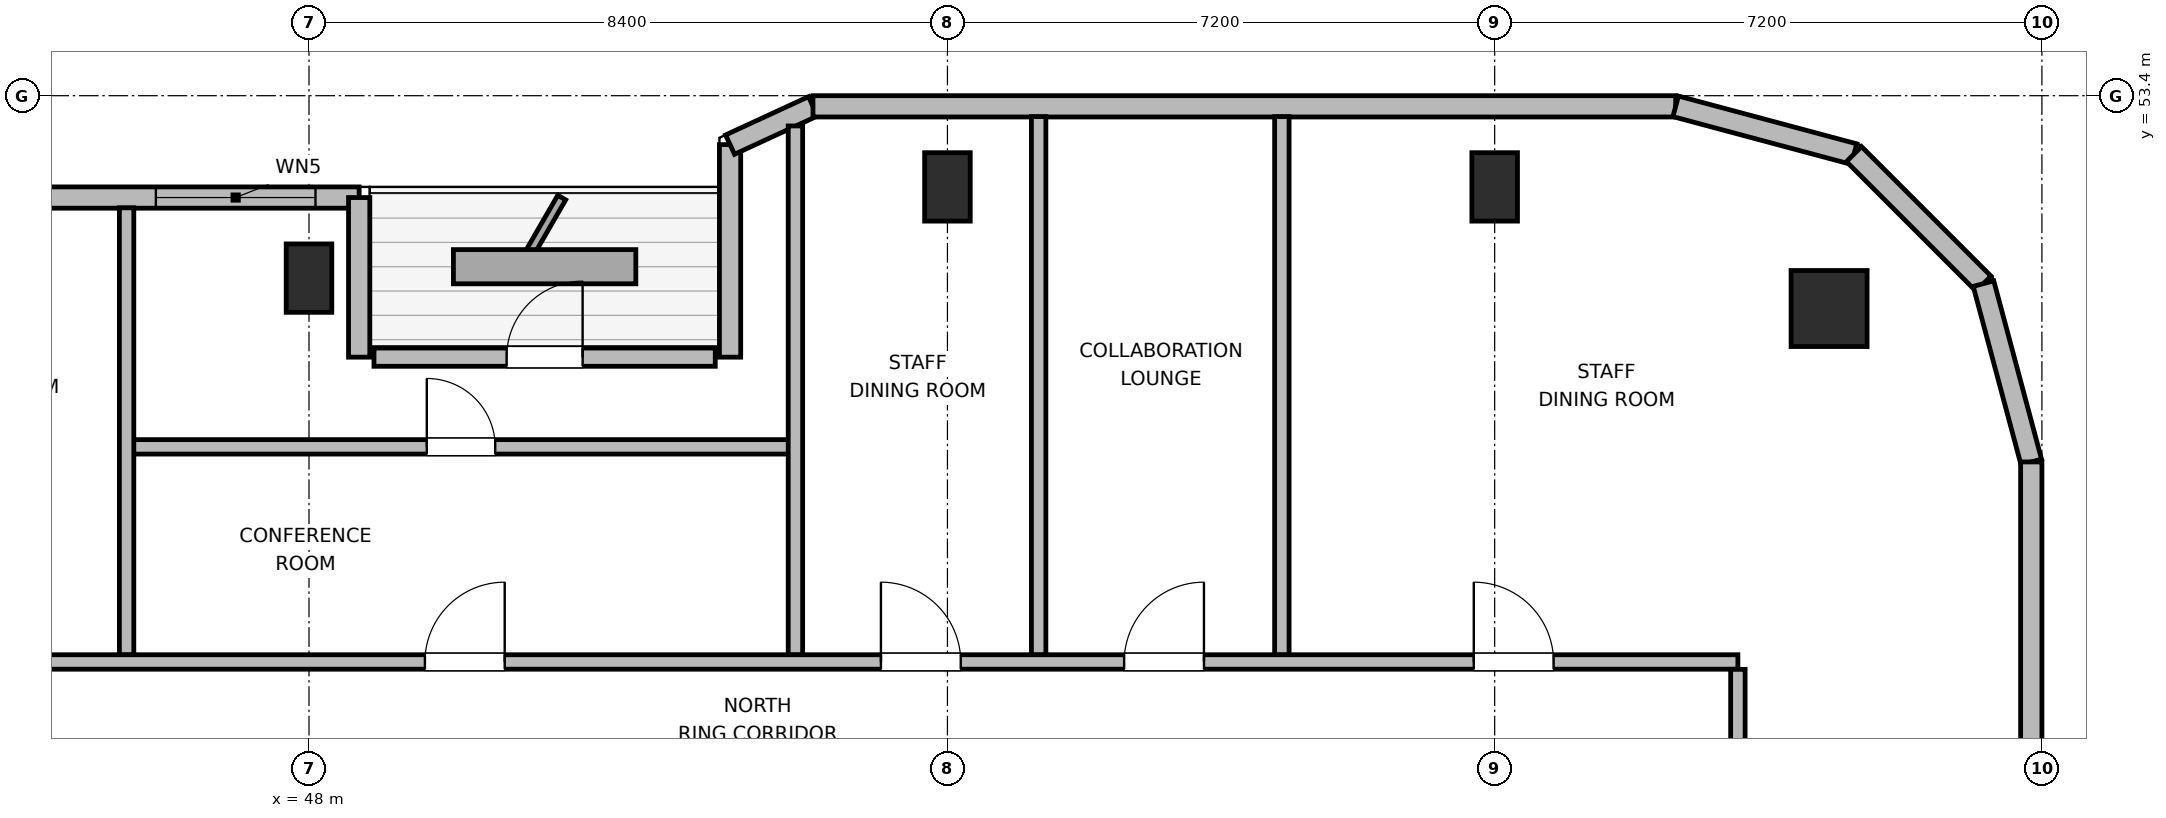
"""IFC4 building model, lengths in metres.
Left out: names, types, materials, properties, quantities, classifications, styles, units other than length and angle.
Written with IfcOpenShell. Run it as: python <this file> out.ifc"""

import sys

from ifc_helpers import new_model, si_unit, direction, frame, frame_2d, origin, origin_2d, place, context, subcontext, project, spatial, rectangle, circle, extrude, element, fill, save


model = new_model("IFC4")
c1 = context("Model", 3, precision=1e-05, world=origin(), true_north=direction((0.0, 1.0)))
c2 = subcontext(c1, "Body", "Model", "MODEL_VIEW")
j1 = project(units=[si_unit("LENGTHUNIT", "METRE"), si_unit("PLANEANGLEUNIT", "RADIAN")], contexts=[c1])
p1 = place(None, origin())
s1 = spatial("IfcSite", under=j1, at=p1, CompositionType="ELEMENT")
p2 = place(p1, origin())
s2 = spatial("IfcBuilding", under=s1, at=p2, CompositionType="ELEMENT")
p3 = place(p2, frame((0.0, 0.0, 346.5)))
s3 = spatial("IfcBuildingStorey", under=s2, at=p3, CompositionType="ELEMENT", Elevation=346.5)
p4 = place(p3, frame((68.0, 50.6, 0.0), z_axis=(0.0, 0.0, 1.0), x_axis=(1.0, 0.0, 0.0)))
e1 = element("IfcColumn", 1, at=p4, inside=s3, PredefinedType="COLUMN", context=c2, shape_type="SweptSolid", body=[
    extrude(circle(Radius=0.5, at=origin_2d()), origin(), (0.0, 0.0, 1.0), 3.9),
])
for number, where, z_axis, x_axis in (
    (2, (48.0, 51.0, 0.0), (0.0, 0.0, 1.0), (1.0, 0.0, 0.0)),
    (3, (56.4, 52.2, 0.0), (0.0, 0.0, 1.0), (1.0, 0.0, 0.0)),
    (4, (63.6, 52.2, 0.0), (0.0, 0.0, 1.0), (1.0, 0.0, 0.0)),
):
    element("IfcColumn", number, at=place(p3, frame(where, z_axis=z_axis, x_axis=x_axis)), inside=s3, PredefinedType="COLUMN", context=c2, shape_type="SweptSolid", body=[
        extrude(rectangle(XDim=0.6, YDim=0.9, at=origin_2d()), origin(), (0.0, 0.0, 1.0), 3.9),
    ])
p5 = place(p3, frame((43.969, 52.06, 0.0), z_axis=(0.0, 0.0, 1.0), x_axis=(1.0, 0.0, 0.0)))
e5 = element("IfcWall", 5, at=p5, inside=s3, PredefinedType="SOLIDWALL", context=c2, shape_type="SweptSolid", body=[
    extrude(rectangle(XDim=4.691, YDim=0.28, at=frame_2d((2.345, 0.0))), origin(), (0.0, 0.0, 1.0), 2.215),
])
p6 = place(p5, frame((2.016, 0.0, 0.85)))
e6 = element("IfcOpeningElement", 6, at=p6, cuts=e5, PredefinedType="OPENING", context=c2, shape_type="SweptSolid", body=[
    extrude(rectangle(XDim=2.1, YDim=1.05, at=frame_2d((1.05, 0.525))), frame((0.0, 0.15, 0.0), z_axis=(0.0, -1.0, 0.0), x_axis=(1.0, 0.0, 0.0)), (0.0, 0.0, 1.0), 0.3),
])
p7 = place(p3, frame((48.66, 52.06, 0.0), z_axis=(0.0, 0.0, 1.0), x_axis=(0.0, -1.0, 0.0)))
e7 = element("IfcWall", 7, at=p7, inside=s3, PredefinedType="SOLIDWALL", context=c2, shape_type="SweptSolid", body=[
    extrude(rectangle(XDim=2.1, YDim=0.28, at=frame_2d((1.05, 0.0))), origin(), (0.0, 0.0, 1.0), 2.215),
])
p8 = place(p3, frame((48.855, 49.96, 0.0), z_axis=(0.0, 0.0, 1.0), x_axis=(1.0, 0.0, 0.0)))
e8 = element("IfcWall", 8, at=p8, inside=s3, PredefinedType="SOLIDWALL", context=c2, shape_type="SweptSolid", body=[
    extrude(rectangle(XDim=4.49, YDim=0.24, at=frame_2d((2.245, 0.0))), origin(), (0.0, 0.0, 1.0), 3.68),
])
p9 = place(p8, frame((1.745, 0.0, 0.0)))
e9 = element("IfcOpeningElement", 9, at=p9, cuts=e8, PredefinedType="OPENING", context=c2, shape_type="SweptSolid", body=[
    extrude(rectangle(XDim=1.0, YDim=2.02, at=frame_2d((0.5, 1.01))), frame((0.0, 0.13, 0.0), z_axis=(0.0, -1.0, 0.0), x_axis=(1.0, 0.0, 0.0)), (0.0, 0.0, 1.0), 0.26),
])
p10 = place(p3, frame((53.54, 49.96, 0.0), z_axis=(0.0, 0.0, 1.0), x_axis=(0.0, 1.0, 0.0)))
e10 = element("IfcWall", 10, at=p10, inside=s3, PredefinedType="SOLIDWALL", context=c2, shape_type="SweptSolid", body=[
    extrude(rectangle(XDim=2.796, YDim=0.28, at=frame_2d((1.398, 0.0))), origin(), (0.0, 0.0, 1.0), 2.215),
])
p11 = place(p3, frame((53.54, 52.756, 0.0), z_axis=(0.0, 0.0, 1.0), x_axis=(0.907893953211, 0.419199916176, 0.0)))
e11 = element("IfcWall", 11, at=p11, inside=s3, PredefinedType="SOLIDWALL", context=c2, shape_type="SweptSolid", body=[
    extrude(rectangle(XDim=1.201, YDim=0.28, at=frame_2d((0.601, 0.0))), origin(), (0.0, 0.0, 1.0), 3.68),
])
p12 = place(p3, frame((54.631, 53.26, 0.0), z_axis=(0.0, 0.0, 1.0), x_axis=(1.0, 0.0, 0.0)))
e12 = element("IfcWall", 12, at=p12, inside=s3, PredefinedType="SOLIDWALL", context=c2, shape_type="SweptSolid", body=[
    extrude(rectangle(XDim=11.351, YDim=0.28, at=frame_2d((5.675, 0.0))), origin(), (0.0, 0.0, 1.0), 3.68),
])
p13 = place(p3, frame((65.982, 53.26, 0.0), z_axis=(0.0, 0.0, 1.0), x_axis=(0.965937282298, -0.25877628691, 0.0)))
e13 = element("IfcWall", 13, at=p13, inside=s3, PredefinedType="SOLIDWALL", context=c2, shape_type="SweptSolid", body=[
    extrude(rectangle(XDim=2.428, YDim=0.28, at=frame_2d((1.214, 0.0))), origin(), (0.0, 0.0, 1.0), 3.68),
])
p14 = place(p3, frame((68.327, 52.632, 0.0), z_axis=(0.0, 0.0, 1.0), x_axis=(0.707106781187, -0.707106781187, 0.0)))
e14 = element("IfcWall", 14, at=p14, inside=s3, PredefinedType="SOLIDWALL", context=c2, shape_type="SweptSolid", body=[
    extrude(rectangle(XDim=2.41, YDim=0.28, at=frame_2d((1.205, 0.0))), origin(), (0.0, 0.0, 1.0), 3.68),
])
p15 = place(p3, frame((70.031, 50.927, 0.0), z_axis=(0.0, 0.0, 1.0), x_axis=(0.258751159445, -0.965944013639, 0.0)))
e15 = element("IfcWall", 15, at=p15, inside=s3, PredefinedType="SOLIDWALL", context=c2, shape_type="SweptSolid", body=[
    extrude(rectangle(XDim=2.429, YDim=0.28, at=frame_2d((1.214, 0.0))), origin(), (0.0, 0.0, 1.0), 3.68),
])
p16 = place(p3, frame((70.66, 48.582, 0.0), z_axis=(0.0, 0.0, 1.0), x_axis=(0.0, -1.0, 0.0)))
e16 = element("IfcWall", 16, at=p16, inside=s3, PredefinedType="SOLIDWALL", context=c2, shape_type="SweptSolid", body=[
    extrude(rectangle(XDim=5.842, YDim=0.28, at=frame_2d((2.921, 0.0))), origin(), (0.0, 0.0, 1.0), 3.68),
])
p17 = place(p3, frame((29.4, 45.95, 0.0), z_axis=(0.0, 0.0, 1.0), x_axis=(1.0, 0.0, 0.0)))
e17 = element("IfcWall", 17, at=p17, inside=s3, PredefinedType="PLUMBINGWALL", context=c2, shape_type="SweptSolid", body=[
    extrude(rectangle(XDim=37.4, YDim=0.19, at=frame_2d((18.7, 0.0))), origin(), (0.0, 0.0, 1.0), 3.68),
])
p18 = place(p17, frame((1.025, 0.0, 0.0)))
e18 = element("IfcOpeningElement", 18, at=p18, cuts=e17, PredefinedType="OPENING", context=c2, shape_type="SweptSolid", body=[
    extrude(rectangle(XDim=1.05, YDim=2.04, at=frame_2d((0.525, 1.02))), frame((0.0, 0.105, 0.0), z_axis=(0.0, -1.0, 0.0), x_axis=(1.0, 0.0, 0.0)), (0.0, 0.0, 1.0), 0.21),
])
p19 = place(p17, frame((4.125, 0.0, 0.0)))
e19 = element("IfcOpeningElement", 19, at=p19, cuts=e17, PredefinedType="OPENING", context=c2, shape_type="SweptSolid", body=[
    extrude(rectangle(XDim=1.05, YDim=2.04, at=frame_2d((0.525, 1.02))), frame((0.0, 0.105, 0.0), z_axis=(0.0, -1.0, 0.0), x_axis=(1.0, 0.0, 0.0)), (0.0, 0.0, 1.0), 0.21),
])
p20 = place(p17, frame((7.325, 0.0, 0.0)))
e20 = element("IfcOpeningElement", 20, at=p20, cuts=e17, PredefinedType="OPENING", context=c2, shape_type="SweptSolid", body=[
    extrude(rectangle(XDim=1.05, YDim=2.04, at=frame_2d((0.525, 1.02))), frame((0.0, 0.105, 0.0), z_axis=(0.0, -1.0, 0.0), x_axis=(1.0, 0.0, 0.0)), (0.0, 0.0, 1.0), 0.21),
])
p21 = place(p17, frame((10.525, 0.0, 0.0)))
e21 = element("IfcOpeningElement", 21, at=p21, cuts=e17, PredefinedType="OPENING", context=c2, shape_type="SweptSolid", body=[
    extrude(rectangle(XDim=1.05, YDim=2.04, at=frame_2d((0.525, 1.02))), frame((0.0, 0.105, 0.0), z_axis=(0.0, -1.0, 0.0), x_axis=(1.0, 0.0, 0.0)), (0.0, 0.0, 1.0), 0.21),
])
p22 = place(p17, frame((13.925, 0.0, 0.0)))
e22 = element("IfcOpeningElement", 22, at=p22, cuts=e17, PredefinedType="OPENING", context=c2, shape_type="SweptSolid", body=[
    extrude(rectangle(XDim=1.05, YDim=2.04, at=frame_2d((0.525, 1.02))), frame((0.0, 0.105, 0.0), z_axis=(0.0, -1.0, 0.0), x_axis=(1.0, 0.0, 0.0)), (0.0, 0.0, 1.0), 0.21),
])
p23 = place(p17, frame((20.125, 0.0, 0.0)))
e23 = element("IfcOpeningElement", 23, at=p23, cuts=e17, PredefinedType="OPENING", context=c2, shape_type="SweptSolid", body=[
    extrude(rectangle(XDim=1.05, YDim=2.04, at=frame_2d((0.525, 1.02))), frame((0.0, 0.105, 0.0), z_axis=(0.0, -1.0, 0.0), x_axis=(1.0, 0.0, 0.0)), (0.0, 0.0, 1.0), 0.21),
])
p24 = place(p17, frame((26.125, 0.0, 0.0)))
e24 = element("IfcOpeningElement", 24, at=p24, cuts=e17, PredefinedType="OPENING", context=c2, shape_type="SweptSolid", body=[
    extrude(rectangle(XDim=1.05, YDim=2.04, at=frame_2d((0.525, 1.02))), frame((0.0, 0.105, 0.0), z_axis=(0.0, -1.0, 0.0), x_axis=(1.0, 0.0, 0.0)), (0.0, 0.0, 1.0), 0.21),
])
p25 = place(p17, frame((29.325, 0.0, 0.0)))
e25 = element("IfcOpeningElement", 25, at=p25, cuts=e17, PredefinedType="OPENING", context=c2, shape_type="SweptSolid", body=[
    extrude(rectangle(XDim=1.05, YDim=2.04, at=frame_2d((0.525, 1.02))), frame((0.0, 0.105, 0.0), z_axis=(0.0, -1.0, 0.0), x_axis=(1.0, 0.0, 0.0)), (0.0, 0.0, 1.0), 0.21),
])
p26 = place(p17, frame((33.925, 0.0, 0.0)))
e26 = element("IfcOpeningElement", 26, at=p26, cuts=e17, PredefinedType="OPENING", context=c2, shape_type="SweptSolid", body=[
    extrude(rectangle(XDim=1.05, YDim=2.04, at=frame_2d((0.525, 1.02))), frame((0.0, 0.105, 0.0), z_axis=(0.0, -1.0, 0.0), x_axis=(1.0, 0.0, 0.0)), (0.0, 0.0, 1.0), 0.21),
])
p27 = place(p3, frame((66.8, 26.147, 0.0), z_axis=(0.0, 0.0, 1.0), x_axis=(0.0, 1.0, 0.0)))
e27 = element("IfcWall", 27, at=p27, inside=s3, PredefinedType="PLUMBINGWALL", context=c2, shape_type="SweptSolid", body=[
    extrude(rectangle(XDim=19.706, YDim=0.19, at=frame_2d((9.853, 0.0))), origin(), (0.0, 0.0, 1.0), 3.68),
])
p28 = place(p27, frame((3.903, 0.0, 0.0)))
e28 = element("IfcOpeningElement", 28, at=p28, cuts=e27, PredefinedType="OPENING", context=c2, shape_type="SweptSolid", body=[
    extrude(rectangle(XDim=1.05, YDim=2.04, at=frame_2d((0.525, 1.02))), frame((0.0, 0.105, 0.0), z_axis=(0.0, -1.0, 0.0), x_axis=(1.0, 0.0, 0.0)), (0.0, 0.0, 1.0), 0.21),
])
p29 = place(p27, frame((13.853, 0.0, 0.0)))
e29 = element("IfcOpeningElement", 29, at=p29, cuts=e27, PredefinedType="OPENING", context=c2, shape_type="SweptSolid", body=[
    extrude(rectangle(XDim=1.05, YDim=2.04, at=frame_2d((0.525, 1.02))), frame((0.0, 0.105, 0.0), z_axis=(0.0, -1.0, 0.0), x_axis=(1.0, 0.0, 0.0)), (0.0, 0.0, 1.0), 0.21),
])
p30 = place(p3, frame((45.6, 48.78, 0.0), z_axis=(0.0, 0.0, 1.0), x_axis=(1.0, 0.0, 0.0)))
e30 = element("IfcWall", 30, at=p30, inside=s3, PredefinedType="PLUMBINGWALL", context=c2, shape_type="SweptSolid", body=[
    extrude(rectangle(XDim=8.8, YDim=0.19, at=frame_2d((4.4, 0.0))), origin(), (0.0, 0.0, 1.0), 3.311),
])
p31 = place(p30, frame((3.95, 0.0, 0.0)))
e31 = element("IfcOpeningElement", 31, at=p31, cuts=e30, PredefinedType="OPENING", context=c2, shape_type="SweptSolid", body=[
    extrude(rectangle(XDim=0.9, YDim=2.02, at=frame_2d((0.45, 1.01))), frame((0.0, 0.105, 0.0), z_axis=(0.0, -1.0, 0.0), x_axis=(1.0, 0.0, 0.0)), (0.0, 0.0, 1.0), 0.21),
])
p32 = place(p3, frame((45.6, 46.047, 0.0), z_axis=(0.0, 0.0, 1.0), x_axis=(0.0, 1.0, 0.0)))
e32 = element("IfcWall", 32, at=p32, inside=s3, PredefinedType="PLUMBINGWALL", context=c2, shape_type="SweptSolid", body=[
    extrude(rectangle(XDim=5.878, YDim=0.19, at=frame_2d((2.939, 0.0))), origin(), (0.0, 0.0, 1.0), 3.68),
])
p33 = place(p3, frame((54.4, 46.047, 0.0), z_axis=(0.0, 0.0, 1.0), x_axis=(0.0, 1.0, 0.0)))
e33 = element("IfcWall", 33, at=p33, inside=s3, PredefinedType="PLUMBINGWALL", context=c2, shape_type="SweptSolid", body=[
    extrude(rectangle(XDim=6.955, YDim=0.19, at=frame_2d((3.478, 0.0))), origin(), (0.0, 0.0, 1.0), 3.043),
])
for number, where, z_axis, x_axis in (
    (34, (57.6, 46.047, 0.0), (0.0, 0.0, 1.0), (0.0, 1.0, 0.0)),
    (35, (60.8, 46.047, 0.0), (0.0, 0.0, 1.0), (0.0, 1.0, 0.0)),
):
    element("IfcWall", number, at=place(p3, frame(where, z_axis=z_axis, x_axis=x_axis)), inside=s3, PredefinedType="PLUMBINGWALL", context=c2, shape_type="SweptSolid", body=[
        extrude(rectangle(XDim=7.078, YDim=0.19, at=frame_2d((3.539, 0.0))), origin(), (0.0, 0.0, 1.0), 3.68),
    ])
p34 = place(p6, origin())
e36 = element("IfcWindow", 36, at=p34, inside=s3, PartitioningType="SINGLE_PANEL", PredefinedType="WINDOW", context=c2, shape_type="SweptSolid", body=[
    extrude(rectangle(XDim=2.1, YDim=1.05, at=frame_2d((1.05, 0.525))), frame((0.0, 0.03, 0.0), z_axis=(0.0, -1.0, 0.0), x_axis=(1.0, 0.0, 0.0)), (0.0, 0.0, 1.0), 0.06),
])
fill(e6, e36)
p35 = place(p9, origin())
e37 = element("IfcDoor", 37, at=p35, inside=s3, OperationType="SINGLE_SWING_RIGHT", PredefinedType="DOOR", context=c2, shape_type="SweptSolid", body=[
    extrude(rectangle(XDim=1.0, YDim=2.02, at=frame_2d((0.5, 1.01))), frame((0.0, 0.025, 0.0), z_axis=(0.0, -1.0, 0.0), x_axis=(1.0, 0.0, 0.0)), (0.0, 0.0, 1.0), 0.05),
])
fill(e9, e37)
p36 = place(p31, origin())
e38 = element("IfcDoor", 38, at=p36, inside=s3, OperationType="SINGLE_SWING_LEFT", PredefinedType="DOOR", context=c2, shape_type="SweptSolid", body=[
    extrude(rectangle(XDim=0.9, YDim=2.02, at=frame_2d((0.45, 1.01))), frame((0.0, 0.025, 0.0), z_axis=(0.0, -1.0, 0.0), x_axis=(1.0, 0.0, 0.0)), (0.0, 0.0, 1.0), 0.05),
])
fill(e31, e38)
p37 = place(p23, origin())
e39 = element("IfcDoor", 39, at=p37, inside=s3, OperationType="SINGLE_SWING_RIGHT", PredefinedType="DOOR", context=c2, shape_type="SweptSolid", body=[
    extrude(rectangle(XDim=1.05, YDim=2.04, at=frame_2d((0.525, 1.02))), frame((0.0, 0.025, 0.0), z_axis=(0.0, -1.0, 0.0), x_axis=(1.0, 0.0, 0.0)), (0.0, 0.0, 1.0), 0.05),
])
fill(e23, e39)
p38 = place(p24, origin())
e40 = element("IfcDoor", 40, at=p38, inside=s3, OperationType="SINGLE_SWING_LEFT", PredefinedType="DOOR", context=c2, shape_type="SweptSolid", body=[
    extrude(rectangle(XDim=1.05, YDim=2.04, at=frame_2d((0.525, 1.02))), frame((0.0, 0.025, 0.0), z_axis=(0.0, -1.0, 0.0), x_axis=(1.0, 0.0, 0.0)), (0.0, 0.0, 1.0), 0.05),
])
fill(e24, e40)
p39 = place(p25, origin())
e41 = element("IfcDoor", 41, at=p39, inside=s3, OperationType="SINGLE_SWING_RIGHT", PredefinedType="DOOR", context=c2, shape_type="SweptSolid", body=[
    extrude(rectangle(XDim=1.05, YDim=2.04, at=frame_2d((0.525, 1.02))), frame((0.0, 0.025, 0.0), z_axis=(0.0, -1.0, 0.0), x_axis=(1.0, 0.0, 0.0)), (0.0, 0.0, 1.0), 0.05),
])
fill(e25, e41)
p40 = place(p26, origin())
e42 = element("IfcDoor", 42, at=p40, inside=s3, OperationType="SINGLE_SWING_LEFT", PredefinedType="DOOR", context=c2, shape_type="SweptSolid", body=[
    extrude(rectangle(XDim=1.05, YDim=2.04, at=frame_2d((0.525, 1.02))), frame((0.0, 0.025, 0.0), z_axis=(0.0, -1.0, 0.0), x_axis=(1.0, 0.0, 0.0)), (0.0, 0.0, 1.0), 0.05),
])
fill(e26, e42)
save(model, sys.argv[1])
